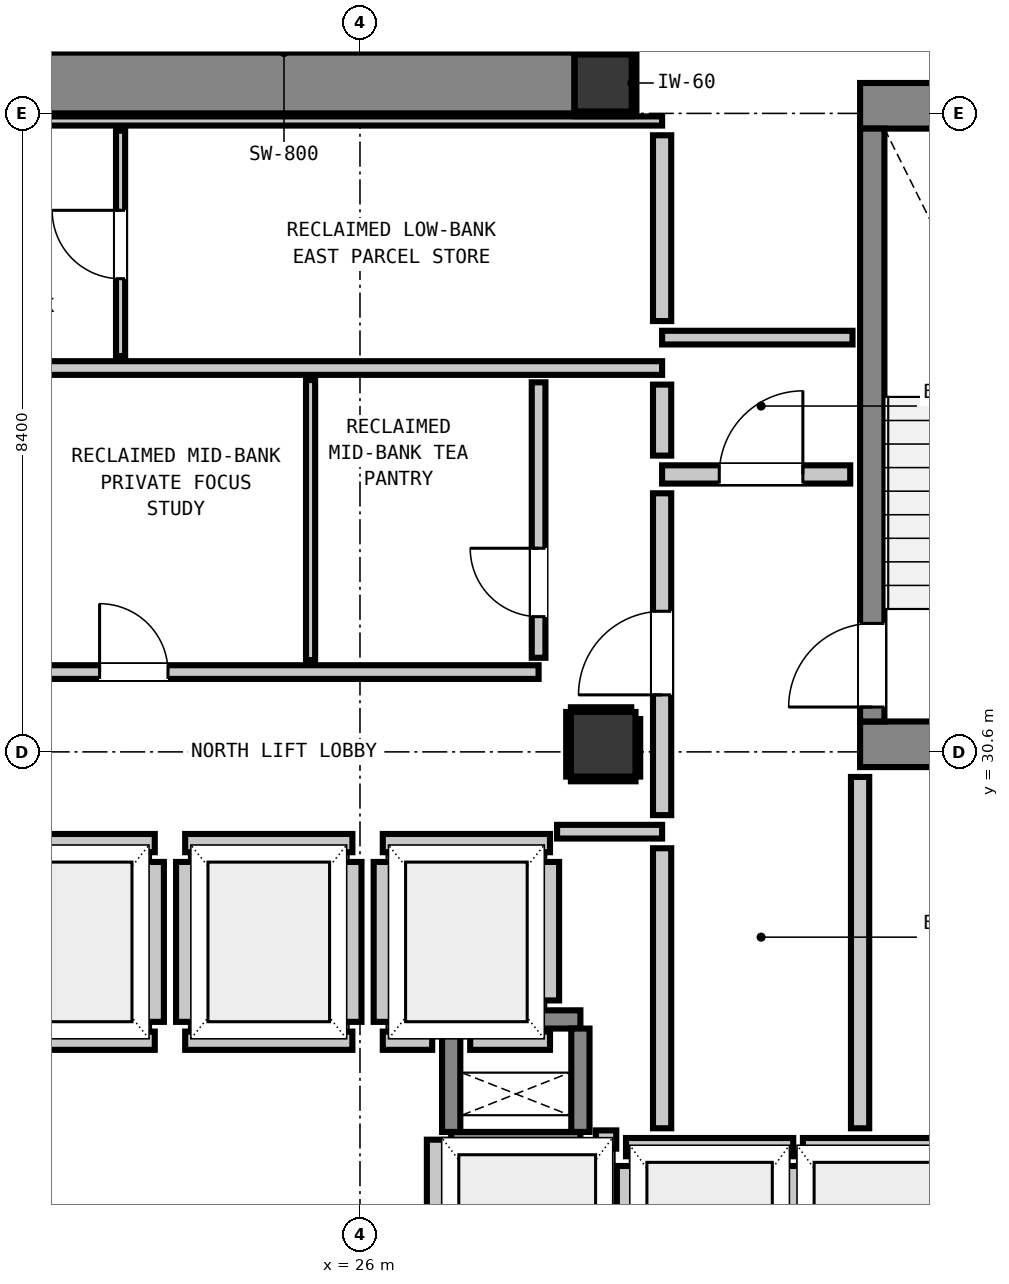
"""IFC4 building model, lengths in metres.
Left out: names, types, materials, properties, quantities, classifications, styles, units other than length and angle.
Written with IfcOpenShell. Run it as: python <this file> out.ifc"""

import sys

from ifc_helpers import new_model, si_unit, direction, frame, frame_2d, origin, origin_2d, place, context, subcontext, project, spatial, rectangle, extrude, element, fill, save


model = new_model("IFC4")
c1 = context("Model", 3, precision=1e-05, world=origin(), true_north=direction((0.0, 1.0)))
c2 = subcontext(c1, "Body", "Model", "MODEL_VIEW")
j1 = project(units=[si_unit("LENGTHUNIT", "METRE"), si_unit("PLANEANGLEUNIT", "RADIAN")], contexts=[c1])
p1 = place(None, origin())
s1 = spatial("IfcSite", under=j1, at=p1, CompositionType="ELEMENT")
p2 = place(p1, origin())
s2 = spatial("IfcBuilding", under=s1, at=p2, CompositionType="ELEMENT")
p3 = place(p2, frame((0.0, 0.0, 196.8)))
s3 = spatial("IfcBuildingStorey", under=s2, at=p3, CompositionType="ELEMENT", Elevation=196.8)
p4 = place(p3, frame((29.2, 39.4, 0.0), z_axis=(0.0, 0.0, 1.0), x_axis=(1.0, 0.0, 0.0)))
e1 = element("IfcColumn", 1, at=p4, inside=s3, PredefinedType="COLUMN", context=c2, shape_type="SweptSolid", body=[
    extrude(rectangle(XDim=0.75, YDim=0.75, at=origin_2d()), origin(), (0.0, 0.0, 1.0), 3.32),
])
p5 = place(p3, frame((32.58, 39.1, 0.0), z_axis=(0.0, 0.0, 1.0), x_axis=(1.0, 0.0, 0.0)))
e2 = element("IfcWall", 2, at=p5, inside=s3, PredefinedType="SHEAR", context=c2, shape_type="SweptSolid", body=[
    extrude(rectangle(XDim=4.08, YDim=0.6, at=frame_2d((2.04, 0.0))), origin(), (0.0, 0.0, 1.0), 3.32),
])
p6 = place(p3, frame((32.58, 30.7, 0.0), z_axis=(0.0, 0.0, 1.0), x_axis=(1.0, 0.0, 0.0)))
e3 = element("IfcWall", 3, at=p6, inside=s3, PredefinedType="SHEAR", context=c2, shape_type="SweptSolid", body=[
    extrude(rectangle(XDim=3.54, YDim=0.6, at=frame_2d((1.77, 0.0))), origin(), (0.0, 0.0, 1.0), 3.32),
])
p7 = place(p3, frame((21.18, 39.4, 0.0), z_axis=(0.0, 0.0, 1.0), x_axis=(1.0, 0.0, 0.0)))
e4 = element("IfcWall", 4, at=p7, inside=s3, PredefinedType="SHEAR", context=c2, shape_type="SweptSolid", body=[
    extrude(rectangle(XDim=7.64, YDim=0.8, at=frame_2d((3.82, 0.0))), origin(), (0.0, 0.0, 1.0), 3.32),
])
p8 = place(p3, frame((32.74, 31.0, 0.0), z_axis=(0.0, 0.0, 1.0), x_axis=(0.0, 1.0, 0.0)))
e5 = element("IfcWall", 5, at=p8, inside=s3, PredefinedType="SHEAR", context=c2, shape_type="SweptSolid", body=[
    extrude(rectangle(XDim=7.8, YDim=0.32, at=frame_2d((3.9, 0.0))), origin(), (0.0, 0.0, 1.0), 3.32),
])
p9 = place(p8, frame((0.19, 0.0, 0.0)))
e6 = element("IfcOpeningElement", 6, at=p9, cuts=e5, PredefinedType="OPENING", context=c2, shape_type="SweptSolid", body=[
    extrude(rectangle(XDim=1.1, YDim=2.15, at=frame_2d((0.55, 1.075))), frame((0.0, 0.17, 0.0), z_axis=(0.0, -1.0, 0.0), x_axis=(1.0, 0.0, 0.0)), (0.0, 0.0, 1.0), 0.34),
])
for number, where, z_axis, x_axis in (
    (7, (27.2, 25.48, 0.0), (0.0, 0.0, 1.0), (1.0, 0.0, 0.0)),
    (8, (27.2, 27.08, 0.0), (0.0, 0.0, 1.0), (1.0, 0.0, 0.0)),
):
    element("IfcWall", number, at=place(p3, frame(where, z_axis=z_axis, x_axis=x_axis)), inside=s3, PredefinedType="SHEAR", context=c2, shape_type="SweptSolid", body=[
        extrude(rectangle(XDim=1.7, YDim=0.24, at=frame_2d((0.85, 0.0))), origin(), (0.0, 0.0, 1.0), 3.32),
    ])
for number, where, z_axis, x_axis in (
    (9, (27.2, 25.6, 0.0), (0.0, 0.0, 1.0), (0.0, 1.0, 0.0)),
    (10, (28.9, 25.6, 0.0), (0.0, 0.0, 1.0), (0.0, 1.0, 0.0)),
):
    element("IfcWall", number, at=place(p3, frame(where, z_axis=z_axis, x_axis=x_axis)), inside=s3, PredefinedType="SHEAR", context=c2, shape_type="SweptSolid", body=[
        extrude(rectangle(XDim=1.36, YDim=0.24, at=frame_2d((0.68, 0.0))), origin(), (0.0, 0.0, 1.0), 3.32),
    ])
p10 = place(p3, frame((29.2, 30.7, 0.0), z_axis=(0.0, 0.0, 1.0), x_axis=(1.0, 0.0, 0.0)))
e11 = element("IfcColumn", 11, at=p10, inside=s3, PredefinedType="COLUMN", context=c2, shape_type="SweptSolid", body=[
    extrude(rectangle(XDim=0.85, YDim=0.85, at=origin_2d()), origin(), (0.0, 0.0, 1.0), 3.32),
])
for number, where, z_axis, x_axis in (
    (12, (21.1, 26.8, 0.0), (0.0, 0.0, 1.0), (1.0, 0.0, 0.0)),
    (13, (21.1, 29.4, 0.0), (0.0, 0.0, 1.0), (1.0, 0.0, 0.0)),
):
    element("IfcWall", number, at=place(p3, frame(where, z_axis=z_axis, x_axis=x_axis)), inside=s3, PredefinedType="PARTITIONING", context=c2, shape_type="SweptSolid", body=[
        extrude(rectangle(XDim=2.2, YDim=0.24, at=frame_2d((1.1, 0.0))), origin(), (0.0, 0.0, 1.0), 3.1),
    ])
p11 = place(p3, frame((23.3, 27.048, 0.0), z_axis=(0.0, 0.0, 1.0), x_axis=(0.0, 1.0, 0.0)))
e14 = element("IfcWall", 14, at=p11, inside=s3, PredefinedType="PARTITIONING", context=c2, shape_type="SweptSolid", body=[
    extrude(rectangle(XDim=2.104, YDim=0.24, at=frame_2d((1.052, 0.0))), origin(), (0.0, 0.0, 1.0), 3.1),
])
for number, where, z_axis, x_axis in (
    (15, (23.7, 26.8, 0.0), (0.0, 0.0, 1.0), (1.0, 0.0, 0.0)),
    (16, (23.7, 29.4, 0.0), (0.0, 0.0, 1.0), (1.0, 0.0, 0.0)),
):
    element("IfcWall", number, at=place(p3, frame(where, z_axis=z_axis, x_axis=x_axis)), inside=s3, PredefinedType="PARTITIONING", context=c2, shape_type="SweptSolid", body=[
        extrude(rectangle(XDim=2.2, YDim=0.24, at=frame_2d((1.1, 0.0))), origin(), (0.0, 0.0, 1.0), 3.1),
    ])
for number, where, z_axis, x_axis in (
    (17, (23.7, 27.048, 0.0), (0.0, 0.0, 1.0), (0.0, 1.0, 0.0)),
    (18, (25.9, 27.048, 0.0), (0.0, 0.0, 1.0), (0.0, 1.0, 0.0)),
):
    element("IfcWall", number, at=place(p3, frame(where, z_axis=z_axis, x_axis=x_axis)), inside=s3, PredefinedType="PARTITIONING", context=c2, shape_type="SweptSolid", body=[
        extrude(rectangle(XDim=2.104, YDim=0.24, at=frame_2d((1.052, 0.0))), origin(), (0.0, 0.0, 1.0), 3.1),
    ])
p12 = place(p3, frame((26.3, 26.8, 0.0), z_axis=(0.0, 0.0, 1.0), x_axis=(1.0, 0.0, 0.0)))
e19 = element("IfcWall", 19, at=p12, inside=s3, PredefinedType="PARTITIONING", context=c2, shape_type="SweptSolid", body=[
    extrude(rectangle(XDim=0.65, YDim=0.24, at=frame_2d((0.325, 0.0))), origin(), (0.0, 0.0, 1.0), 3.1),
])
p13 = place(p3, frame((27.45, 26.8, 0.0), z_axis=(0.0, 0.0, 1.0), x_axis=(1.0, 0.0, 0.0)))
e20 = element("IfcWall", 20, at=p13, inside=s3, PredefinedType="PARTITIONING", context=c2, shape_type="SweptSolid", body=[
    extrude(rectangle(XDim=1.05, YDim=0.24, at=frame_2d((0.525, 0.0))), origin(), (0.0, 0.0, 1.0), 3.1),
])
p14 = place(p3, frame((26.3, 29.4, 0.0), z_axis=(0.0, 0.0, 1.0), x_axis=(1.0, 0.0, 0.0)))
e21 = element("IfcWall", 21, at=p14, inside=s3, PredefinedType="PARTITIONING", context=c2, shape_type="SweptSolid", body=[
    extrude(rectangle(XDim=2.2, YDim=0.24, at=frame_2d((1.1, 0.0))), origin(), (0.0, 0.0, 1.0), 3.1),
])
p15 = place(p3, frame((26.3, 27.048, 0.0), z_axis=(0.0, 0.0, 1.0), x_axis=(0.0, 1.0, 0.0)))
e22 = element("IfcWall", 22, at=p15, inside=s3, PredefinedType="PARTITIONING", context=c2, shape_type="SweptSolid", body=[
    extrude(rectangle(XDim=2.104, YDim=0.24, at=frame_2d((1.052, 0.0))), origin(), (0.0, 0.0, 1.0), 3.1),
])
p16 = place(p3, frame((28.5, 27.33, 0.0), z_axis=(0.0, 0.0, 1.0), x_axis=(0.0, 1.0, 0.0)))
e23 = element("IfcWall", 23, at=p16, inside=s3, PredefinedType="PARTITIONING", context=c2, shape_type="SweptSolid", body=[
    extrude(rectangle(XDim=1.822, YDim=0.24, at=frame_2d((0.911, 0.0))), origin(), (0.0, 0.0, 1.0), 3.1),
])
p17 = place(p3, frame((29.5, 25.4, 0.0), z_axis=(0.0, 0.0, 1.0), x_axis=(1.0, 0.0, 0.0)))
e24 = element("IfcWall", 24, at=p17, inside=s3, PredefinedType="PARTITIONING", context=c2, shape_type="SweptSolid", body=[
    extrude(rectangle(XDim=2.2, YDim=0.24, at=frame_2d((1.1, 0.0))), origin(), (0.0, 0.0, 1.0), 3.1),
])
p18 = place(p3, frame((29.5, 22.848, 0.0), z_axis=(0.0, 0.0, 1.0), x_axis=(0.0, 1.0, 0.0)))
e25 = element("IfcWall", 25, at=p18, inside=s3, PredefinedType="PARTITIONING", context=c2, shape_type="SweptSolid", body=[
    extrude(rectangle(XDim=2.304, YDim=0.24, at=frame_2d((1.152, 0.0))), origin(), (0.0, 0.0, 1.0), 2.335),
])
p19 = place(p3, frame((31.7, 22.848, 0.0), z_axis=(0.0, 0.0, 1.0), x_axis=(0.0, 1.0, 0.0)))
e26 = element("IfcWall", 26, at=p19, inside=s3, PredefinedType="PARTITIONING", context=c2, shape_type="SweptSolid", body=[
    extrude(rectangle(XDim=2.304, YDim=0.24, at=frame_2d((1.152, 0.0))), origin(), (0.0, 0.0, 1.0), 3.1),
])
p20 = place(p3, frame((31.828, 25.4, 0.0), z_axis=(0.0, 0.0, 1.0), x_axis=(1.0, 0.0, 0.0)))
e27 = element("IfcWall", 27, at=p20, inside=s3, PredefinedType="PARTITIONING", context=c2, shape_type="SweptSolid", body=[
    extrude(rectangle(XDim=2.072, YDim=0.24, at=frame_2d((1.036, 0.0))), origin(), (0.0, 0.0, 1.0), 3.1),
])
p21 = place(p3, frame((29.103, 25.5, 0.0), z_axis=(0.0, 0.0, 1.0), x_axis=(1.0, 0.0, 0.0)))
e28 = element("IfcWall", 28, at=p21, inside=s3, PredefinedType="PARTITIONING", context=c2, shape_type="SweptSolid", body=[
    extrude(rectangle(XDim=0.269, YDim=0.24, at=frame_2d((0.135, 0.0))), origin(), (0.0, 0.0, 1.0), 3.1),
])
p22 = place(p3, frame((27.0, 22.848, 0.0), z_axis=(0.0, 0.0, 1.0), x_axis=(0.0, 1.0, 0.0)))
e29 = element("IfcWall", 29, at=p22, inside=s3, PredefinedType="PARTITIONING", context=c2, shape_type="SweptSolid", body=[
    extrude(rectangle(XDim=2.65, YDim=0.24, at=frame_2d((1.325, 0.0))), origin(), (0.0, 0.0, 1.0), 3.1),
])
p23 = place(p3, frame((29.975, 34.25, 0.0), z_axis=(0.0, 0.0, 1.0), x_axis=(1.0, 0.0, 0.0)))
e30 = element("IfcWall", 30, at=p23, inside=s3, PredefinedType="PARTITIONING", context=c2, shape_type="SweptSolid", body=[
    extrude(rectangle(XDim=2.475, YDim=0.24, at=frame_2d((1.237, 0.0))), origin(), (0.0, 0.0, 1.0), 3.1),
])
p24 = place(p23, frame((0.752, 0.0, 0.0)))
e31 = element("IfcOpeningElement", 31, at=p24, cuts=e30, PredefinedType="OPENING", context=c2, shape_type="SweptSolid", body=[
    extrude(rectangle(XDim=1.1, YDim=2.15, at=frame_2d((0.55, 1.075))), frame((0.0, 0.13, 0.0), z_axis=(0.0, -1.0, 0.0), x_axis=(1.0, 0.0, 0.0)), (0.0, 0.0, 1.0), 0.26),
])
p25 = place(p3, frame((28.593, 29.55, 0.0), z_axis=(0.0, 0.0, 1.0), x_axis=(1.0, 0.0, 0.0)))
e32 = element("IfcWall", 32, at=p25, inside=s3, PredefinedType="PARTITIONING", context=c2, shape_type="SweptSolid", body=[
    extrude(rectangle(XDim=1.382, YDim=0.18, at=frame_2d((0.691, 0.0))), origin(), (0.0, 0.0, 1.0), 3.1),
])
p26 = place(p3, frame((20.65, 31.65, 0.0), z_axis=(0.0, 0.0, 1.0), x_axis=(1.0, 0.0, 0.0)))
e33 = element("IfcWall", 33, at=p26, inside=s3, PredefinedType="PARTITIONING", context=c2, shape_type="SweptSolid", body=[
    extrude(rectangle(XDim=7.7, YDim=0.18, at=frame_2d((3.85, 0.0))), origin(), (0.0, 0.0, 1.0), 3.1),
])
p27 = place(p26, frame((1.924, 0.0, 0.0)))
e34 = element("IfcOpeningElement", 34, at=p27, cuts=e33, PredefinedType="OPENING", context=c2, shape_type="SweptSolid", body=[
    extrude(rectangle(XDim=0.9, YDim=2.1, at=frame_2d((0.45, 1.05))), frame((0.0, 0.1, 0.0), z_axis=(0.0, -1.0, 0.0), x_axis=(1.0, 0.0, 0.0)), (0.0, 0.0, 1.0), 0.2),
])
p28 = place(p3, frame((18.95, 35.65, 0.0), z_axis=(0.0, 0.0, 1.0), x_axis=(1.0, 0.0, 0.0)))
e35 = element("IfcWall", 35, at=p28, inside=s3, PredefinedType="PARTITIONING", context=c2, shape_type="SweptSolid", body=[
    extrude(rectangle(XDim=11.025, YDim=0.18, at=frame_2d((5.513, 0.0))), origin(), (0.0, 0.0, 1.0), 3.1),
])
p29 = place(p3, frame((29.975, 36.05, 0.0), z_axis=(0.0, 0.0, 1.0), x_axis=(1.0, 0.0, 0.0)))
e36 = element("IfcWall", 36, at=p29, inside=s3, PredefinedType="PARTITIONING", context=c2, shape_type="SweptSolid", body=[
    extrude(rectangle(XDim=2.505, YDim=0.18, at=frame_2d((1.252, 0.0))), origin(), (0.0, 0.0, 1.0), 3.1),
])
p30 = place(p3, frame((18.95, 38.9, 0.0), z_axis=(0.0, 0.0, 1.0), x_axis=(1.0, 0.0, 0.0)))
e37 = element("IfcWall", 37, at=p30, inside=s3, PredefinedType="PARTITIONING", context=c2, shape_type="SweptSolid", body=[
    extrude(rectangle(XDim=11.025, YDim=0.12, at=frame_2d((5.513, 0.0))), origin(), (0.0, 0.0, 1.0), 3.1),
])
p31 = place(p3, frame((29.975, 25.648, 0.0), z_axis=(0.0, 0.0, 1.0), x_axis=(0.0, 1.0, 0.0)))
e38 = element("IfcWall", 38, at=p31, inside=s3, PredefinedType="PARTITIONING", context=c2, shape_type="SweptSolid", body=[
    extrude(rectangle(XDim=3.684, YDim=0.24, at=frame_2d((1.842, 0.0))), origin(), (0.0, 0.0, 1.0), 3.1),
])
p32 = place(p3, frame((29.975, 29.768, 0.0), z_axis=(0.0, 0.0, 1.0), x_axis=(0.0, 1.0, 0.0)))
e39 = element("IfcWall", 39, at=p32, inside=s3, PredefinedType="PARTITIONING", context=c2, shape_type="SweptSolid", body=[
    extrude(rectangle(XDim=4.234, YDim=0.24, at=frame_2d((2.117, 0.0))), origin(), (0.0, 0.0, 1.0), 3.1),
])
p33 = place(p32, frame((1.582, 0.0, 0.0)))
e40 = element("IfcOpeningElement", 40, at=p33, cuts=e39, PredefinedType="OPENING", context=c2, shape_type="SweptSolid", body=[
    extrude(rectangle(XDim=1.1, YDim=2.15, at=frame_2d((0.55, 1.075))), frame((0.0, 0.13, 0.0), z_axis=(0.0, -1.0, 0.0), x_axis=(1.0, 0.0, 0.0)), (0.0, 0.0, 1.0), 0.26),
])
p34 = place(p3, frame((29.975, 34.498, 0.0), z_axis=(0.0, 0.0, 1.0), x_axis=(0.0, 1.0, 0.0)))
e41 = element("IfcWall", 41, at=p34, inside=s3, PredefinedType="PARTITIONING", context=c2, shape_type="SweptSolid", body=[
    extrude(rectangle(XDim=0.934, YDim=0.24, at=frame_2d((0.467, 0.0))), origin(), (0.0, 0.0, 1.0), 3.1),
])
p35 = place(p3, frame((29.975, 36.268, 0.0), z_axis=(0.0, 0.0, 1.0), x_axis=(0.0, 1.0, 0.0)))
e42 = element("IfcWall", 42, at=p35, inside=s3, PredefinedType="PARTITIONING", context=c2, shape_type="SweptSolid", body=[
    extrude(rectangle(XDim=2.444, YDim=0.24, at=frame_2d((1.222, 0.0))), origin(), (0.0, 0.0, 1.0), 3.1),
])
p36 = place(p3, frame((32.58, 25.648, 0.0), z_axis=(0.0, 0.0, 1.0), x_axis=(0.0, 1.0, 0.0)))
e43 = element("IfcWall", 43, at=p36, inside=s3, PredefinedType="PARTITIONING", context=c2, shape_type="SweptSolid", body=[
    extrude(rectangle(XDim=4.622, YDim=0.24, at=frame_2d((2.311, 0.0))), origin(), (0.0, 0.0, 1.0), 3.1),
])
p37 = place(p3, frame((28.35, 31.838, 0.0), z_axis=(0.0, 0.0, 1.0), x_axis=(0.0, 1.0, 0.0)))
e44 = element("IfcWall", 44, at=p37, inside=s3, PredefinedType="PARTITIONING", context=c2, shape_type="SweptSolid", body=[
    extrude(rectangle(XDim=3.624, YDim=0.18, at=frame_2d((1.812, 0.0))), origin(), (0.0, 0.0, 1.0), 3.1),
])
p38 = place(p37, frame((0.541, 0.0, 0.0)))
e45 = element("IfcOpeningElement", 45, at=p38, cuts=e44, PredefinedType="OPENING", context=c2, shape_type="SweptSolid", body=[
    extrude(rectangle(XDim=0.9, YDim=2.1, at=frame_2d((0.45, 1.05))), frame((0.0, 0.1, 0.0), z_axis=(0.0, -1.0, 0.0), x_axis=(1.0, 0.0, 0.0)), (0.0, 0.0, 1.0), 0.2),
])
p39 = place(p3, frame((22.85, 35.808, 0.0), z_axis=(0.0, 0.0, 1.0), x_axis=(0.0, 1.0, 0.0)))
e46 = element("IfcWall", 46, at=p39, inside=s3, PredefinedType="PARTITIONING", context=c2, shape_type="SweptSolid", body=[
    extrude(rectangle(XDim=2.964, YDim=0.12, at=frame_2d((1.482, 0.0))), origin(), (0.0, 0.0, 1.0), 3.1),
])
p40 = place(p39, frame((1.017, 0.0, 0.0)))
e47 = element("IfcOpeningElement", 47, at=p40, cuts=e46, PredefinedType="OPENING", context=c2, shape_type="SweptSolid", body=[
    extrude(rectangle(XDim=0.9, YDim=2.1, at=frame_2d((0.45, 1.05))), frame((0.0, 0.07, 0.0), z_axis=(0.0, -1.0, 0.0), x_axis=(1.0, 0.0, 0.0)), (0.0, 0.0, 1.0), 0.14),
])
p41 = place(p3, frame((25.35, 31.808, 0.0), z_axis=(0.0, 0.0, 1.0), x_axis=(0.0, 1.0, 0.0)))
e48 = element("IfcWall", 48, at=p41, inside=s3, PredefinedType="PARTITIONING", context=c2, shape_type="SweptSolid", body=[
    extrude(rectangle(XDim=3.684, YDim=0.12, at=frame_2d((1.842, 0.0))), origin(), (0.0, 0.0, 1.0), 3.1),
])
for number, where, z_axis, x_axis in (
    (49, (28.833, 38.993, 0.0), (0.0, 0.0, 1.0), (1.0, 0.0, 0.0)),
    (50, (28.833, 39.807, 0.0), (0.0, 0.0, 1.0), (1.0, 0.0, 0.0)),
):
    element("IfcWall", number, at=place(p3, frame(where, z_axis=z_axis, x_axis=x_axis)), inside=s3, PredefinedType="PARTITIONING", context=c2, shape_type="SweptSolid", body=[
        extrude(rectangle(XDim=0.742, YDim=0.06, at=frame_2d((0.371, 0.0))), origin(), (0.0, 0.0, 1.0), 1.45),
    ])
p42 = place(p3, frame((29.607, 39.025, 0.0), z_axis=(0.0, 0.0, 1.0), x_axis=(0.0, 1.0, 0.0)))
e51 = element("IfcWall", 51, at=p42, inside=s3, PredefinedType="PARTITIONING", context=c2, shape_type="SweptSolid", body=[
    extrude(rectangle(XDim=0.75, YDim=0.06, at=frame_2d((0.375, 0.0))), origin(), (0.0, 0.0, 1.0), 1.45),
])
p43 = place(p3, frame((28.775, 30.243, 0.0), z_axis=(0.0, 0.0, 1.0), x_axis=(1.0, 0.0, 0.0)))
e52 = element("IfcWall", 52, at=p43, inside=s3, PredefinedType="PARTITIONING", context=c2, shape_type="SweptSolid", body=[
    extrude(rectangle(XDim=0.85, YDim=0.06, at=frame_2d((0.425, 0.0))), origin(), (0.0, 0.0, 1.0), 1.45),
])
p44 = place(p3, frame((28.775, 31.157, 0.0), z_axis=(0.0, 0.0, 1.0), x_axis=(1.0, 0.0, 0.0)))
e53 = element("IfcWall", 53, at=p44, inside=s3, PredefinedType="PARTITIONING", context=c2, shape_type="SweptSolid", body=[
    extrude(rectangle(XDim=0.794, YDim=0.06, at=frame_2d((0.397, 0.0))), origin(), (0.0, 0.0, 1.0), 1.45),
])
p45 = place(p3, frame((28.743, 30.275, 0.0), z_axis=(0.0, 0.0, 1.0), x_axis=(0.0, 1.0, 0.0)))
e54 = element("IfcWall", 54, at=p45, inside=s3, PredefinedType="PARTITIONING", context=c2, shape_type="SweptSolid", body=[
    extrude(rectangle(XDim=0.85, YDim=0.06, at=frame_2d((0.425, 0.0))), origin(), (0.0, 0.0, 1.0), 1.45),
])
p46 = place(p3, frame((29.657, 30.275, 0.0), z_axis=(0.0, 0.0, 1.0), x_axis=(0.0, 1.0, 0.0)))
e55 = element("IfcWall", 55, at=p46, inside=s3, PredefinedType="PARTITIONING", context=c2, shape_type="SweptSolid", body=[
    extrude(rectangle(XDim=0.757, YDim=0.06, at=frame_2d((0.378, 0.0))), origin(), (0.0, 0.0, 1.0), 1.45),
])
p47 = place(p9, origin())
e56 = element("IfcDoor", 56, at=p47, inside=s3, OperationType="SINGLE_SWING_LEFT", PredefinedType="DOOR", context=c2, shape_type="SweptSolid", body=[
    extrude(rectangle(XDim=1.1, YDim=2.15, at=frame_2d((0.55, 1.075))), frame((0.0, 0.025, 0.0), z_axis=(0.0, -1.0, 0.0), x_axis=(1.0, 0.0, 0.0)), (0.0, 0.0, 1.0), 0.05),
])
fill(e6, e56)
p48 = place(p33, origin())
e57 = element("IfcDoor", 57, at=p48, inside=s3, OperationType="SINGLE_SWING_LEFT", PredefinedType="DOOR", context=c2, shape_type="SweptSolid", body=[
    extrude(rectangle(XDim=1.1, YDim=2.15, at=frame_2d((0.55, 1.075))), frame((0.0, 0.025, 0.0), z_axis=(0.0, -1.0, 0.0), x_axis=(1.0, 0.0, 0.0)), (0.0, 0.0, 1.0), 0.05),
])
fill(e40, e57)
p49 = place(p24, origin())
e58 = element("IfcDoor", 58, at=p49, inside=s3, OperationType="SINGLE_SWING_RIGHT", PredefinedType="DOOR", context=c2, shape_type="SweptSolid", body=[
    extrude(rectangle(XDim=1.1, YDim=2.15, at=frame_2d((0.55, 1.075))), frame((0.0, 0.025, 0.0), z_axis=(0.0, -1.0, 0.0), x_axis=(1.0, 0.0, 0.0)), (0.0, 0.0, 1.0), 0.05),
])
fill(e31, e58)
p50 = place(p40, origin())
e59 = element("IfcDoor", 59, at=p50, inside=s3, OperationType="SINGLE_SWING_RIGHT", PredefinedType="DOOR", context=c2, shape_type="SweptSolid", body=[
    extrude(rectangle(XDim=0.9, YDim=2.1, at=frame_2d((0.45, 1.05))), frame((0.0, 0.025, 0.0), z_axis=(0.0, -1.0, 0.0), x_axis=(1.0, 0.0, 0.0)), (0.0, 0.0, 1.0), 0.05),
])
fill(e47, e59)
p51 = place(p27, origin())
e60 = element("IfcDoor", 60, at=p51, inside=s3, OperationType="SINGLE_SWING_LEFT", PredefinedType="DOOR", context=c2, shape_type="SweptSolid", body=[
    extrude(rectangle(XDim=0.9, YDim=2.1, at=frame_2d((0.45, 1.05))), frame((0.0, 0.025, 0.0), z_axis=(0.0, -1.0, 0.0), x_axis=(1.0, 0.0, 0.0)), (0.0, 0.0, 1.0), 0.05),
])
fill(e34, e60)
p52 = place(p38, origin())
e61 = element("IfcDoor", 61, at=p52, inside=s3, OperationType="SINGLE_SWING_RIGHT", PredefinedType="DOOR", context=c2, shape_type="SweptSolid", body=[
    extrude(rectangle(XDim=0.9, YDim=2.1, at=frame_2d((0.45, 1.05))), frame((0.0, 0.025, 0.0), z_axis=(0.0, -1.0, 0.0), x_axis=(1.0, 0.0, 0.0)), (0.0, 0.0, 1.0), 0.05),
])
fill(e45, e61)
save(model, sys.argv[1])
